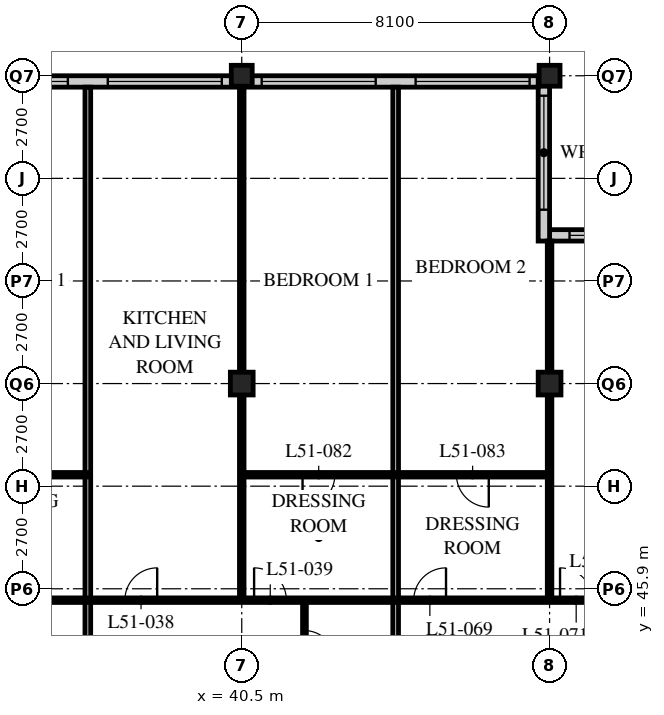
"""IFC4 building model, lengths in metres.
Left out: names, types, materials, properties, quantities, classifications, styles, units other than length and angle.
Written with IfcOpenShell. Run it as: python <this file> out.ifc"""

import sys

from ifc_helpers import new_model, si_unit, direction, frame, frame_2d, origin, origin_2d, place, context, subcontext, project, spatial, rectangle, hollow_rectangle, extrude, element, fill, save


model = new_model("IFC4")
c1 = context("Model", 3, precision=1e-05, world=origin(), true_north=direction((0.0, 1.0)))
c2 = subcontext(c1, "Body", "Model", "MODEL_VIEW")
j1 = project(units=[si_unit("LENGTHUNIT", "METRE"), si_unit("PLANEANGLEUNIT", "RADIAN")], contexts=[c1])
p1 = place(None, origin())
s1 = spatial("IfcSite", under=j1, at=p1, CompositionType="ELEMENT")
p2 = place(p1, origin())
s2 = spatial("IfcBuilding", under=s1, at=p2, CompositionType="ELEMENT")
p3 = place(p2, frame((0.0, 0.0, 199.2)))
s3 = spatial("IfcBuildingStorey", under=s2, at=p3, CompositionType="ELEMENT", Elevation=199.2)
p4 = place(p3, frame((40.5, 51.3, 0.0), z_axis=(0.0, 0.0, 1.0), x_axis=(1.0, 0.0, 0.0)))
e1 = element("IfcColumn", 1, at=p4, inside=s3, PredefinedType="COLUMN", context=c2, shape_type="SweptSolid", body=[
    extrude(hollow_rectangle(XDim=0.6, YDim=0.6, WallThickness=0.05, at=origin_2d()), origin(), (0.0, 0.0, 1.0), 3.6),
])
p5 = place(p3, frame((40.5, 59.4, 0.0), z_axis=(0.0, 0.0, 1.0), x_axis=(1.0, 0.0, 0.0)))
e2 = element("IfcColumn", 2, at=p5, inside=s3, PredefinedType="COLUMN", context=c2, shape_type="SweptSolid", body=[
    extrude(hollow_rectangle(XDim=0.55, YDim=0.55, WallThickness=0.045, at=origin_2d()), origin(), (0.0, 0.0, 1.0), 3.6),
])
p6 = place(p3, frame((48.6, 51.3, 0.0), z_axis=(0.0, 0.0, 1.0), x_axis=(1.0, 0.0, 0.0)))
e3 = element("IfcColumn", 3, at=p6, inside=s3, PredefinedType="COLUMN", context=c2, shape_type="SweptSolid", body=[
    extrude(hollow_rectangle(XDim=0.6, YDim=0.6, WallThickness=0.05, at=origin_2d()), origin(), (0.0, 0.0, 1.0), 3.6),
])
p7 = place(p3, frame((48.6, 59.4, 0.0), z_axis=(0.0, 0.0, 1.0), x_axis=(1.0, 0.0, 0.0)))
e4 = element("IfcColumn", 4, at=p7, inside=s3, PredefinedType="COLUMN", context=c2, shape_type="SweptSolid", body=[
    extrude(hollow_rectangle(XDim=0.55, YDim=0.55, WallThickness=0.045, at=origin_2d()), origin(), (0.0, 0.0, 1.0), 3.6),
])
p8 = place(p3, frame((52.35, 55.2, 0.0), z_axis=(0.0, 0.0, 1.0), x_axis=(-1.0, 0.0, 0.0)))
e5 = element("IfcWall", 5, at=p8, inside=s3, PredefinedType="SOLIDWALL", context=c2, shape_type="SweptSolid", body=[
    extrude(rectangle(XDim=3.75, YDim=0.3, at=frame_2d((1.875, 0.0))), origin(), (0.0, 0.0, 1.0), 3.39),
])
p9 = place(p8, frame((0.225, 0.0, 0.6)))
e6 = element("IfcOpeningElement", 6, at=p9, cuts=e5, PredefinedType="OPENING", context=c2, shape_type="SweptSolid", body=[
    extrude(rectangle(XDim=3.0, YDim=2.0, at=frame_2d((1.5, 1.0))), frame((0.0, 0.16, 0.0), z_axis=(0.0, -1.0, 0.0), x_axis=(1.0, 0.0, 0.0)), (0.0, 0.0, 1.0), 0.32),
])
p10 = place(p3, frame((48.45, 55.05, 0.0), z_axis=(0.0, 0.0, 1.0), x_axis=(0.0, 1.0, 0.0)))
e7 = element("IfcWall", 7, at=p10, inside=s3, PredefinedType="SOLIDWALL", context=c2, shape_type="SweptSolid", body=[
    extrude(rectangle(XDim=4.35, YDim=0.3, at=frame_2d((2.175, 0.0))), origin(), (0.0, 0.0, 1.0), 3.39),
])
p11 = place(p10, frame((0.825, 0.0, 0.6)))
e8 = element("IfcOpeningElement", 8, at=p11, cuts=e7, PredefinedType="OPENING", context=c2, shape_type="SweptSolid", body=[
    extrude(rectangle(XDim=3.0, YDim=2.0, at=frame_2d((1.5, 1.0))), frame((0.0, 0.16, 0.0), z_axis=(0.0, -1.0, 0.0), x_axis=(1.0, 0.0, 0.0)), (0.0, 0.0, 1.0), 0.32),
])
p12 = place(p3, frame((48.3, 59.25, 0.0), z_axis=(0.0, 0.0, 1.0), x_axis=(-1.0, 0.0, 0.0)))
e9 = element("IfcWall", 9, at=p12, inside=s3, PredefinedType="SOLIDWALL", context=c2, shape_type="SweptSolid", body=[
    extrude(rectangle(XDim=40.2, YDim=0.3, at=frame_2d((20.1, 0.0))), origin(), (0.0, 0.0, 1.0), 3.39),
])
p13 = place(p12, frame((0.225, 0.0, 0.6)))
e10 = element("IfcOpeningElement", 10, at=p13, cuts=e9, PredefinedType="OPENING", context=c2, shape_type="SweptSolid", body=[
    extrude(rectangle(XDim=3.0, YDim=2.4, at=frame_2d((1.5, 1.2))), frame((0.0, 0.16, 0.0), z_axis=(0.0, -1.0, 0.0), x_axis=(1.0, 0.0, 0.0)), (0.0, 0.0, 1.0), 0.32),
])
p14 = place(p12, frame((4.275, 0.0, 0.6)))
e11 = element("IfcOpeningElement", 11, at=p14, cuts=e9, PredefinedType="OPENING", context=c2, shape_type="SweptSolid", body=[
    extrude(rectangle(XDim=3.0, YDim=2.4, at=frame_2d((1.5, 1.2))), frame((0.0, 0.16, 0.0), z_axis=(0.0, -1.0, 0.0), x_axis=(1.0, 0.0, 0.0)), (0.0, 0.0, 1.0), 0.32),
])
p15 = place(p12, frame((8.325, 0.0, 0.6)))
e12 = element("IfcOpeningElement", 12, at=p15, cuts=e9, PredefinedType="OPENING", context=c2, shape_type="SweptSolid", body=[
    extrude(rectangle(XDim=3.0, YDim=2.4, at=frame_2d((1.5, 1.2))), frame((0.0, 0.16, 0.0), z_axis=(0.0, -1.0, 0.0), x_axis=(1.0, 0.0, 0.0)), (0.0, 0.0, 1.0), 0.32),
])
p16 = place(p12, frame((12.375, 0.0, 0.6)))
e13 = element("IfcOpeningElement", 13, at=p16, cuts=e9, PredefinedType="OPENING", context=c2, shape_type="SweptSolid", body=[
    extrude(rectangle(XDim=3.0, YDim=2.4, at=frame_2d((1.5, 1.2))), frame((0.0, 0.16, 0.0), z_axis=(0.0, -1.0, 0.0), x_axis=(1.0, 0.0, 0.0)), (0.0, 0.0, 1.0), 0.32),
])
p17 = place(p12, frame((16.425, 0.0, 0.6)))
e14 = element("IfcOpeningElement", 14, at=p17, cuts=e9, PredefinedType="OPENING", context=c2, shape_type="SweptSolid", body=[
    extrude(rectangle(XDim=3.0, YDim=2.4, at=frame_2d((1.5, 1.2))), frame((0.0, 0.16, 0.0), z_axis=(0.0, -1.0, 0.0), x_axis=(1.0, 0.0, 0.0)), (0.0, 0.0, 1.0), 0.32),
])
p18 = place(p12, frame((20.475, 0.0, 0.6)))
e15 = element("IfcOpeningElement", 15, at=p18, cuts=e9, PredefinedType="OPENING", context=c2, shape_type="SweptSolid", body=[
    extrude(rectangle(XDim=3.0, YDim=2.4, at=frame_2d((1.5, 1.2))), frame((0.0, 0.16, 0.0), z_axis=(0.0, -1.0, 0.0), x_axis=(1.0, 0.0, 0.0)), (0.0, 0.0, 1.0), 0.32),
])
p19 = place(p12, frame((24.525, 0.0, 0.6)))
e16 = element("IfcOpeningElement", 16, at=p19, cuts=e9, PredefinedType="OPENING", context=c2, shape_type="SweptSolid", body=[
    extrude(rectangle(XDim=3.0, YDim=2.4, at=frame_2d((1.5, 1.2))), frame((0.0, 0.16, 0.0), z_axis=(0.0, -1.0, 0.0), x_axis=(1.0, 0.0, 0.0)), (0.0, 0.0, 1.0), 0.32),
])
p20 = place(p12, frame((28.575, 0.0, 0.6)))
e17 = element("IfcOpeningElement", 17, at=p20, cuts=e9, PredefinedType="OPENING", context=c2, shape_type="SweptSolid", body=[
    extrude(rectangle(XDim=3.0, YDim=2.4, at=frame_2d((1.5, 1.2))), frame((0.0, 0.16, 0.0), z_axis=(0.0, -1.0, 0.0), x_axis=(1.0, 0.0, 0.0)), (0.0, 0.0, 1.0), 0.32),
])
p21 = place(p12, frame((32.625, 0.0, 0.6)))
e18 = element("IfcOpeningElement", 18, at=p21, cuts=e9, PredefinedType="OPENING", context=c2, shape_type="SweptSolid", body=[
    extrude(rectangle(XDim=3.0, YDim=2.4, at=frame_2d((1.5, 1.2))), frame((0.0, 0.16, 0.0), z_axis=(0.0, -1.0, 0.0), x_axis=(1.0, 0.0, 0.0)), (0.0, 0.0, 1.0), 0.32),
])
p22 = place(p12, frame((36.675, 0.0, 0.6)))
e19 = element("IfcOpeningElement", 19, at=p22, cuts=e9, PredefinedType="OPENING", context=c2, shape_type="SweptSolid", body=[
    extrude(rectangle(XDim=3.0, YDim=2.4, at=frame_2d((1.5, 1.2))), frame((0.0, 0.16, 0.0), z_axis=(0.0, -1.0, 0.0), x_axis=(1.0, 0.0, 0.0)), (0.0, 0.0, 1.0), 0.32),
])
p23 = place(p3, frame((36.45, 43.2, 0.0), z_axis=(0.0, 0.0, 1.0), x_axis=(0.0, 1.0, 0.0)))
e20 = element("IfcWall", 20, at=p23, inside=s3, PredefinedType="PARTITIONING", context=c2, shape_type="SweptSolid", body=[
    extrude(rectangle(XDim=15.9, YDim=0.15, at=frame_2d((7.95, 0.0))), origin(), (0.0, 0.0, 1.0), 3.39),
])
p24 = place(p3, frame((42.15, 43.2, 0.0), z_axis=(0.0, 0.0, 1.0), x_axis=(0.0, 1.0, 0.0)))
e21 = element("IfcWall", 21, at=p24, inside=s3, PredefinedType="PARTITIONING", context=c2, shape_type="SweptSolid", body=[
    extrude(rectangle(XDim=2.4, YDim=0.1, at=frame_2d((1.2, 0.0))), origin(), (0.0, 0.0, 1.0), 3.39),
])
p25 = place(p24, frame((0.8, 0.0, 0.0)))
e22 = element("IfcOpeningElement", 22, at=p25, cuts=e21, PredefinedType="OPENING", context=c2, shape_type="SweptSolid", body=[
    extrude(rectangle(XDim=0.8, YDim=2.1, at=frame_2d((0.4, 1.05))), frame((0.0, 0.06, 0.0), z_axis=(0.0, -1.0, 0.0), x_axis=(1.0, 0.0, 0.0)), (0.0, 0.0, 1.0), 0.12),
])
p26 = place(p3, frame((40.5, 45.6, 0.0), z_axis=(0.0, 0.0, 1.0), x_axis=(0.0, 1.0, 0.0)))
e23 = element("IfcWall", 23, at=p26, inside=s3, PredefinedType="PARTITIONING", context=c2, shape_type="SweptSolid", body=[
    extrude(rectangle(XDim=13.5, YDim=0.12, at=frame_2d((6.75, 0.0))), origin(), (0.0, 0.0, 1.0), 2.778),
])
p27 = place(p3, frame((48.6, 45.6, 0.0), z_axis=(0.0, 0.0, 1.0), x_axis=(0.0, 1.0, 0.0)))
e24 = element("IfcWall", 24, at=p27, inside=s3, PredefinedType="PARTITIONING", context=c2, shape_type="SweptSolid", body=[
    extrude(rectangle(XDim=9.45, YDim=0.12, at=frame_2d((4.725, 0.0))), origin(), (0.0, 0.0, 1.0), 2.778),
])
p28 = place(p3, frame((44.55, 43.2, 0.0), z_axis=(0.0, 0.0, 1.0), x_axis=(0.0, 1.0, 0.0)))
e25 = element("IfcWall", 25, at=p28, inside=s3, PredefinedType="PARTITIONING", context=c2, shape_type="SweptSolid", body=[
    extrude(rectangle(XDim=15.9, YDim=0.15, at=frame_2d((7.95, 0.0))), origin(), (0.0, 0.0, 1.0), 3.39),
])
p29 = place(p3, frame((4.1, 45.6, 0.0), z_axis=(0.0, 0.0, 1.0), x_axis=(1.0, 0.0, 0.0)))
e26 = element("IfcWall", 26, at=p29, inside=s3, PredefinedType="PARTITIONING", context=c2, shape_type="SweptSolid", body=[
    extrude(rectangle(XDim=48.5, YDim=0.12, at=frame_2d((24.25, 0.0))), origin(), (0.0, 0.0, 1.0), 3.39),
])
p30 = place(p29, frame((9.025, 0.0, 0.0)))
e27 = element("IfcOpeningElement", 27, at=p30, cuts=e26, PredefinedType="OPENING", context=c2, shape_type="SweptSolid", body=[
    extrude(rectangle(XDim=0.85, YDim=2.1, at=frame_2d((0.425, 1.05))), frame((0.0, 0.07, 0.0), z_axis=(0.0, -1.0, 0.0), x_axis=(1.0, 0.0, 0.0)), (0.0, 0.0, 1.0), 0.14),
])
p31 = place(p29, frame((16.475, 0.0, 0.0)))
e28 = element("IfcOpeningElement", 28, at=p31, cuts=e26, PredefinedType="OPENING", context=c2, shape_type="SweptSolid", body=[
    extrude(rectangle(XDim=0.85, YDim=2.1, at=frame_2d((0.425, 1.05))), frame((0.0, 0.07, 0.0), z_axis=(0.0, -1.0, 0.0), x_axis=(1.0, 0.0, 0.0)), (0.0, 0.0, 1.0), 0.14),
])
p32 = place(p29, frame((20.525, 0.0, 0.0)))
e29 = element("IfcOpeningElement", 29, at=p32, cuts=e26, PredefinedType="OPENING", context=c2, shape_type="SweptSolid", body=[
    extrude(rectangle(XDim=0.85, YDim=2.1, at=frame_2d((0.425, 1.05))), frame((0.0, 0.07, 0.0), z_axis=(0.0, -1.0, 0.0), x_axis=(1.0, 0.0, 0.0)), (0.0, 0.0, 1.0), 0.14),
])
p33 = place(p29, frame((25.225, 0.0, 0.0)))
e30 = element("IfcOpeningElement", 30, at=p33, cuts=e26, PredefinedType="OPENING", context=c2, shape_type="SweptSolid", body=[
    extrude(rectangle(XDim=0.85, YDim=2.1, at=frame_2d((0.425, 1.05))), frame((0.0, 0.07, 0.0), z_axis=(0.0, -1.0, 0.0), x_axis=(1.0, 0.0, 0.0)), (0.0, 0.0, 1.0), 0.14),
])
p34 = place(p29, frame((28.625, 0.0, 0.0)))
e31 = element("IfcOpeningElement", 31, at=p34, cuts=e26, PredefinedType="OPENING", context=c2, shape_type="SweptSolid", body=[
    extrude(rectangle(XDim=0.85, YDim=2.1, at=frame_2d((0.425, 1.05))), frame((0.0, 0.07, 0.0), z_axis=(0.0, -1.0, 0.0), x_axis=(1.0, 0.0, 0.0)), (0.0, 0.0, 1.0), 0.14),
])
p35 = place(p29, frame((33.325, 0.0, 0.0)))
e32 = element("IfcOpeningElement", 32, at=p35, cuts=e26, PredefinedType="OPENING", context=c2, shape_type="SweptSolid", body=[
    extrude(rectangle(XDim=0.85, YDim=2.1, at=frame_2d((0.425, 1.05))), frame((0.0, 0.07, 0.0), z_axis=(0.0, -1.0, 0.0), x_axis=(1.0, 0.0, 0.0)), (0.0, 0.0, 1.0), 0.14),
])
p36 = place(p29, frame((36.725, 0.0, 0.0)))
e33 = element("IfcOpeningElement", 33, at=p36, cuts=e26, PredefinedType="OPENING", context=c2, shape_type="SweptSolid", body=[
    extrude(rectangle(XDim=0.85, YDim=2.1, at=frame_2d((0.425, 1.05))), frame((0.0, 0.07, 0.0), z_axis=(0.0, -1.0, 0.0), x_axis=(1.0, 0.0, 0.0)), (0.0, 0.0, 1.0), 0.14),
])
p37 = place(p29, frame((40.925, 0.0, 0.0)))
e34 = element("IfcOpeningElement", 34, at=p37, cuts=e26, PredefinedType="OPENING", context=c2, shape_type="SweptSolid", body=[
    extrude(rectangle(XDim=0.85, YDim=2.1, at=frame_2d((0.425, 1.05))), frame((0.0, 0.07, 0.0), z_axis=(0.0, -1.0, 0.0), x_axis=(1.0, 0.0, 0.0)), (0.0, 0.0, 1.0), 0.14),
])
p38 = place(p29, frame((44.775, 0.0, 0.0)))
e35 = element("IfcOpeningElement", 35, at=p38, cuts=e26, PredefinedType="OPENING", context=c2, shape_type="SweptSolid", body=[
    extrude(rectangle(XDim=0.85, YDim=2.1, at=frame_2d((0.425, 1.05))), frame((0.0, 0.07, 0.0), z_axis=(0.0, -1.0, 0.0), x_axis=(1.0, 0.0, 0.0)), (0.0, 0.0, 1.0), 0.14),
])
p39 = place(p29, frame((6.725, 0.0, 0.0)))
e36 = element("IfcOpeningElement", 36, at=p39, cuts=e26, PredefinedType="OPENING", context=c2, shape_type="SweptSolid", body=[
    extrude(rectangle(XDim=0.85, YDim=2.1, at=frame_2d((0.425, 1.05))), frame((0.0, 0.07, 0.0), z_axis=(0.0, -1.0, 0.0), x_axis=(1.0, 0.0, 0.0)), (0.0, 0.0, 1.0), 0.14),
])
p40 = place(p29, frame((2.875, 0.0, 0.0)))
e37 = element("IfcOpeningElement", 37, at=p40, cuts=e26, PredefinedType="OPENING", context=c2, shape_type="SweptSolid", body=[
    extrude(rectangle(XDim=0.85, YDim=2.1, at=frame_2d((0.425, 1.05))), frame((0.0, 0.07, 0.0), z_axis=(0.0, -1.0, 0.0), x_axis=(1.0, 0.0, 0.0)), (0.0, 0.0, 1.0), 0.14),
])
p41 = place(p3, frame((32.4, 48.9, 0.0), z_axis=(0.0, 0.0, 1.0), x_axis=(1.0, 0.0, 0.0)))
e38 = element("IfcWall", 38, at=p41, inside=s3, PredefinedType="PARTITIONING", context=c2, shape_type="SweptSolid", body=[
    extrude(rectangle(XDim=4.05, YDim=0.12, at=frame_2d((2.025, 0.0))), origin(), (0.0, 0.0, 1.0), 3.39),
])
p42 = place(p41, frame((1.6, 0.0, 0.0)))
e39 = element("IfcOpeningElement", 39, at=p42, cuts=e38, PredefinedType="OPENING", context=c2, shape_type="SweptSolid", body=[
    extrude(rectangle(XDim=0.85, YDim=2.1, at=frame_2d((0.425, 1.05))), frame((0.0, 0.07, 0.0), z_axis=(0.0, -1.0, 0.0), x_axis=(1.0, 0.0, 0.0)), (0.0, 0.0, 1.0), 0.14),
])
p43 = place(p3, frame((40.5, 48.9, 0.0), z_axis=(0.0, 0.0, 1.0), x_axis=(1.0, 0.0, 0.0)))
e40 = element("IfcWall", 40, at=p43, inside=s3, PredefinedType="PARTITIONING", context=c2, shape_type="SweptSolid", body=[
    extrude(rectangle(XDim=8.1, YDim=0.12, at=frame_2d((4.05, 0.0))), origin(), (0.0, 0.0, 1.0), 3.39),
])
p44 = place(p43, frame((1.6, 0.0, 0.0)))
e41 = element("IfcOpeningElement", 41, at=p44, cuts=e40, PredefinedType="OPENING", context=c2, shape_type="SweptSolid", body=[
    extrude(rectangle(XDim=0.85, YDim=2.1, at=frame_2d((0.425, 1.05))), frame((0.0, 0.07, 0.0), z_axis=(0.0, -1.0, 0.0), x_axis=(1.0, 0.0, 0.0)), (0.0, 0.0, 1.0), 0.14),
])
p45 = place(p43, frame((5.65, 0.0, 0.0)))
e42 = element("IfcOpeningElement", 42, at=p45, cuts=e40, PredefinedType="OPENING", context=c2, shape_type="SweptSolid", body=[
    extrude(rectangle(XDim=0.85, YDim=2.1, at=frame_2d((0.425, 1.05))), frame((0.0, 0.07, 0.0), z_axis=(0.0, -1.0, 0.0), x_axis=(1.0, 0.0, 0.0)), (0.0, 0.0, 1.0), 0.14),
])
p46 = place(p9, origin())
e43 = element("IfcWindow", 43, at=p46, inside=s3, PartitioningType="SINGLE_PANEL", PredefinedType="WINDOW", context=c2, shape_type="SweptSolid", body=[
    extrude(rectangle(XDim=3.0, YDim=2.0, at=frame_2d((1.5, 1.0))), frame((0.0, 0.03, 0.0), z_axis=(0.0, -1.0, 0.0), x_axis=(1.0, 0.0, 0.0)), (0.0, 0.0, 1.0), 0.06),
])
fill(e6, e43)
p47 = place(p11, origin())
e44 = element("IfcWindow", 44, at=p47, inside=s3, PartitioningType="SINGLE_PANEL", PredefinedType="WINDOW", context=c2, shape_type="SweptSolid", body=[
    extrude(rectangle(XDim=3.0, YDim=2.0, at=frame_2d((1.5, 1.0))), frame((0.0, 0.03, 0.0), z_axis=(0.0, -1.0, 0.0), x_axis=(1.0, 0.0, 0.0)), (0.0, 0.0, 1.0), 0.06),
])
fill(e8, e44)
p48 = place(p13, origin())
e45 = element("IfcWindow", 45, at=p48, inside=s3, PartitioningType="SINGLE_PANEL", PredefinedType="WINDOW", context=c2, shape_type="SweptSolid", body=[
    extrude(rectangle(XDim=3.0, YDim=2.4, at=frame_2d((1.5, 1.2))), frame((0.0, 0.03, 0.0), z_axis=(0.0, -1.0, 0.0), x_axis=(1.0, 0.0, 0.0)), (0.0, 0.0, 1.0), 0.06),
])
fill(e10, e45)
p49 = place(p14, origin())
e46 = element("IfcWindow", 46, at=p49, inside=s3, PartitioningType="SINGLE_PANEL", PredefinedType="WINDOW", context=c2, shape_type="SweptSolid", body=[
    extrude(rectangle(XDim=3.0, YDim=2.4, at=frame_2d((1.5, 1.2))), frame((0.0, 0.03, 0.0), z_axis=(0.0, -1.0, 0.0), x_axis=(1.0, 0.0, 0.0)), (0.0, 0.0, 1.0), 0.06),
])
fill(e11, e46)
p50 = place(p15, origin())
e47 = element("IfcWindow", 47, at=p50, inside=s3, PartitioningType="SINGLE_PANEL", PredefinedType="WINDOW", context=c2, shape_type="SweptSolid", body=[
    extrude(rectangle(XDim=3.0, YDim=2.4, at=frame_2d((1.5, 1.2))), frame((0.0, 0.03, 0.0), z_axis=(0.0, -1.0, 0.0), x_axis=(1.0, 0.0, 0.0)), (0.0, 0.0, 1.0), 0.06),
])
fill(e12, e47)
p51 = place(p16, origin())
e48 = element("IfcWindow", 48, at=p51, inside=s3, PartitioningType="SINGLE_PANEL", PredefinedType="WINDOW", context=c2, shape_type="SweptSolid", body=[
    extrude(rectangle(XDim=3.0, YDim=2.4, at=frame_2d((1.5, 1.2))), frame((0.0, 0.03, 0.0), z_axis=(0.0, -1.0, 0.0), x_axis=(1.0, 0.0, 0.0)), (0.0, 0.0, 1.0), 0.06),
])
fill(e13, e48)
p52 = place(p25, origin())
e49 = element("IfcDoor", 49, at=p52, inside=s3, OperationType="SINGLE_SWING_RIGHT", PredefinedType="DOOR", context=c2, shape_type="SweptSolid", body=[
    extrude(rectangle(XDim=0.8, YDim=2.1, at=frame_2d((0.4, 1.05))), frame((0.0, 0.025, 0.0), z_axis=(0.0, -1.0, 0.0), x_axis=(1.0, 0.0, 0.0)), (0.0, 0.0, 1.0), 0.05),
])
fill(e22, e49)
p53 = place(p35, origin())
e50 = element("IfcDoor", 50, at=p53, inside=s3, OperationType="SINGLE_SWING_RIGHT", PredefinedType="DOOR", context=c2, shape_type="SweptSolid", body=[
    extrude(rectangle(XDim=0.85, YDim=2.1, at=frame_2d((0.425, 1.05))), frame((0.0, 0.025, 0.0), z_axis=(0.0, -1.0, 0.0), x_axis=(1.0, 0.0, 0.0)), (0.0, 0.0, 1.0), 0.05),
])
fill(e32, e50)
p54 = place(p36, origin())
e51 = element("IfcDoor", 51, at=p54, inside=s3, OperationType="SINGLE_SWING_LEFT", PredefinedType="DOOR", context=c2, shape_type="SweptSolid", body=[
    extrude(rectangle(XDim=0.85, YDim=2.1, at=frame_2d((0.425, 1.05))), frame((0.0, 0.025, 0.0), z_axis=(0.0, -1.0, 0.0), x_axis=(1.0, 0.0, 0.0)), (0.0, 0.0, 1.0), 0.05),
])
fill(e33, e51)
p55 = place(p37, origin())
e52 = element("IfcDoor", 52, at=p55, inside=s3, OperationType="SINGLE_SWING_RIGHT", PredefinedType="DOOR", context=c2, shape_type="SweptSolid", body=[
    extrude(rectangle(XDim=0.85, YDim=2.1, at=frame_2d((0.425, 1.05))), frame((0.0, 0.025, 0.0), z_axis=(0.0, -1.0, 0.0), x_axis=(1.0, 0.0, 0.0)), (0.0, 0.0, 1.0), 0.05),
])
fill(e34, e52)
p56 = place(p38, origin())
e53 = element("IfcDoor", 53, at=p56, inside=s3, OperationType="SINGLE_SWING_LEFT", PredefinedType="DOOR", context=c2, shape_type="SweptSolid", body=[
    extrude(rectangle(XDim=0.85, YDim=2.1, at=frame_2d((0.425, 1.05))), frame((0.0, 0.025, 0.0), z_axis=(0.0, -1.0, 0.0), x_axis=(1.0, 0.0, 0.0)), (0.0, 0.0, 1.0), 0.05),
])
fill(e35, e53)
p57 = place(p44, origin())
e54 = element("IfcDoor", 54, at=p57, inside=s3, OperationType="SINGLE_SWING_RIGHT", PredefinedType="DOOR", context=c2, shape_type="SweptSolid", body=[
    extrude(rectangle(XDim=0.85, YDim=2.1, at=frame_2d((0.425, 1.05))), frame((0.0, 0.025, 0.0), z_axis=(0.0, -1.0, 0.0), x_axis=(1.0, 0.0, 0.0)), (0.0, 0.0, 1.0), 0.05),
])
fill(e41, e54)
p58 = place(p45, origin())
e55 = element("IfcDoor", 55, at=p58, inside=s3, OperationType="SINGLE_SWING_LEFT", PredefinedType="DOOR", context=c2, shape_type="SweptSolid", body=[
    extrude(rectangle(XDim=0.85, YDim=2.1, at=frame_2d((0.425, 1.05))), frame((0.0, 0.025, 0.0), z_axis=(0.0, -1.0, 0.0), x_axis=(1.0, 0.0, 0.0)), (0.0, 0.0, 1.0), 0.05),
])
fill(e42, e55)
save(model, sys.argv[1])
